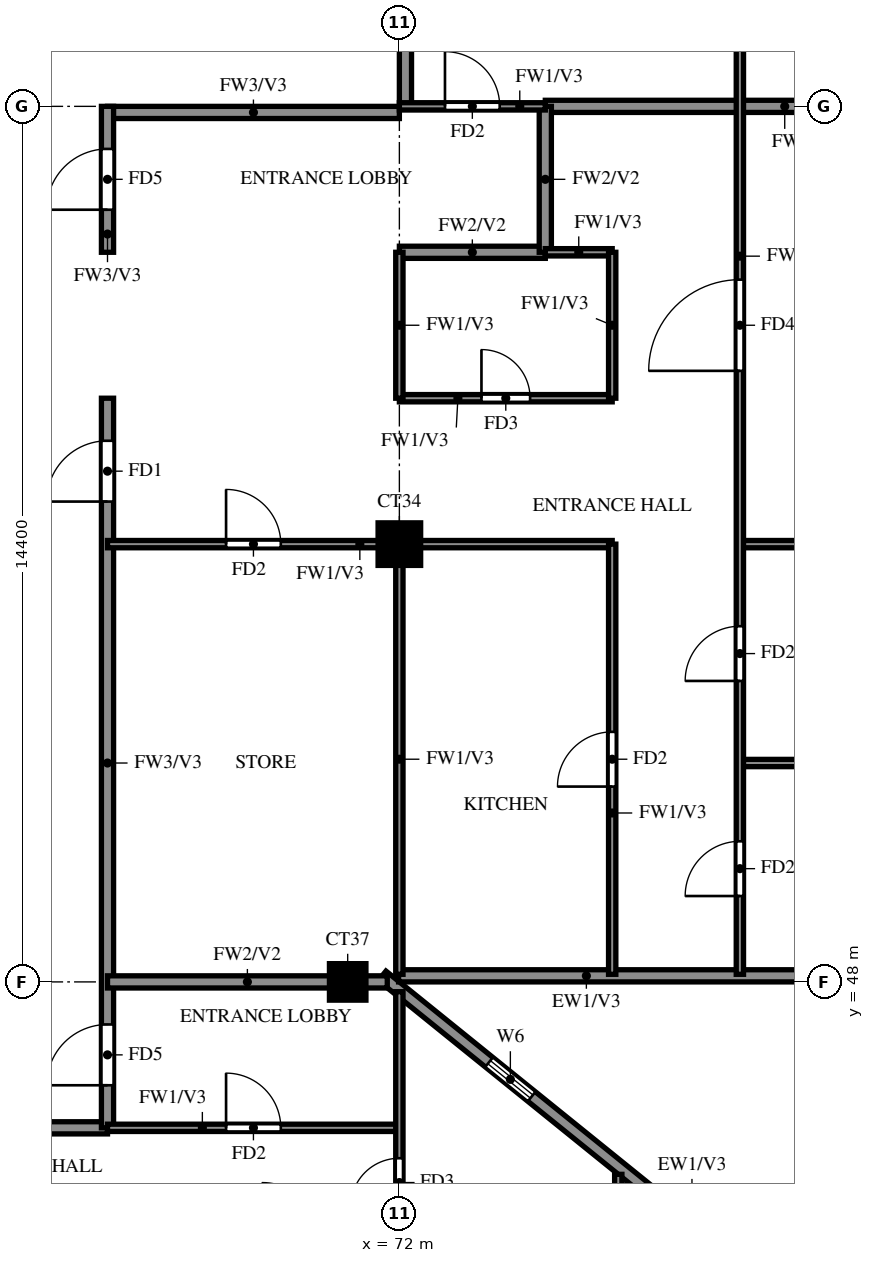
"""IFC4 building model, lengths in metres.
Left out: names, types, materials, properties, quantities, classifications, styles, units other than length and angle.
Written with IfcOpenShell. Run it as: python <this file> out.ifc"""

import sys

from ifc_helpers import new_model, si_unit, direction, frame, frame_2d, origin, origin_2d, place, context, subcontext, project, spatial, rectangle, extrude, source, transform, mapped, element, fill, save


model = new_model("IFC4")
c1 = context("Model", 3, precision=1e-05, world=origin(), true_north=direction((0.0, 1.0)))
c2 = subcontext(c1, "Body", "Model", "MODEL_VIEW")
j1 = project(units=[si_unit("LENGTHUNIT", "METRE"), si_unit("PLANEANGLEUNIT", "RADIAN")], contexts=[c1])
p1 = place(None, origin())
s1 = spatial("IfcSite", under=j1, at=p1, CompositionType="ELEMENT")
p2 = place(p1, origin())
s2 = spatial("IfcBuilding", under=s1, at=p2, CompositionType="ELEMENT")
p3 = place(p2, frame((0.0, 0.0, 260.5)))
s3 = spatial("IfcBuildingStorey", under=s2, at=p3, CompositionType="ELEMENT", Elevation=260.5)
m1 = source(origin(), c2, "Body", "SweptSolid", [
    extrude(rectangle(XDim=0.6, YDim=0.6, at=origin_2d()), origin(), (0.0, 0.0, 1.0), 3.22),
])
p4 = place(p3, frame((71.15, 48.0, 0.0), z_axis=(0.0, 0.0, 1.0), x_axis=(1.0, 0.0, 0.0)))
e1 = element("IfcColumn", 1, at=p4, inside=s3, PredefinedType="COLUMN", context=c2, shape_type="MappedRepresentation", body=[
    mapped(m1, transform((0.0, 0.0, 0.0))),
])
m2 = source(origin(), c2, "Body", "SweptSolid", [
    extrude(rectangle(XDim=0.7, YDim=0.7, at=origin_2d()), origin(), (0.0, 0.0, 1.0), 3.22),
])
p5 = place(p3, frame((72.0, 55.2, 0.0), z_axis=(0.0, 0.0, 1.0), x_axis=(1.0, 0.0, 0.0)))
e2 = element("IfcColumn", 2, at=p5, inside=s3, PredefinedType="COLUMN", context=c2, shape_type="MappedRepresentation", body=[
    mapped(m2, transform((0.0, 0.0, 0.0))),
])
p6 = place(p3, frame((81.907, 39.87, 0.0), z_axis=(0.0, 0.0, 1.0), x_axis=(-0.777936274417, 0.62834318087, 0.0)))
e3 = element("IfcWall", 3, at=p6, inside=s3, PredefinedType="SOLIDWALL", context=c2, shape_type="SweptSolid", body=[
    extrude(rectangle(XDim=13.099, YDim=0.2, at=frame_2d((6.549, 0.0))), origin(), (0.0, 0.0, 1.0), 3.22),
])
p7 = place(p6, frame((9.938, 0.0, 1.5)))
e4 = element("IfcOpeningElement", 4, at=p7, cuts=e3, PredefinedType="OPENING", context=c2, shape_type="SweptSolid", body=[
    extrude(rectangle(XDim=0.9, YDim=0.9, at=frame_2d((0.45, 0.45))), frame((0.0, 0.11, 0.0), z_axis=(0.0, -1.0, 0.0), x_axis=(1.0, 0.0, 0.0)), (0.0, 0.0, 1.0), 0.22),
])
p8 = place(p3, frame((71.987, 48.1, 0.0), z_axis=(0.0, 0.0, 1.0), x_axis=(1.0, 0.0, 0.0)))
e5 = element("IfcWall", 5, at=p8, inside=s3, PredefinedType="SOLIDWALL", context=c2, shape_type="SweptSolid", body=[
    extrude(rectangle(XDim=6.863, YDim=0.2, at=frame_2d((3.432, 0.0))), origin(), (0.0, 0.0, 1.0), 3.22),
])
p9 = place(p3, frame((60.0, 45.6, 0.0), z_axis=(0.0, 0.0, 1.0), x_axis=(1.0, 0.0, 0.0)))
e6 = element("IfcWall", 6, at=p9, inside=s3, PredefinedType="SOLIDWALL", context=c2, shape_type="SweptSolid", body=[
    extrude(rectangle(XDim=7.2, YDim=0.2, at=frame_2d((3.6, 0.0))), origin(), (0.0, 0.0, 1.0), 3.22),
])
p10 = place(p3, frame((67.2, 62.3, 0.0), z_axis=(0.0, 0.0, 1.0), x_axis=(1.0, 0.0, 0.0)))
e7 = element("IfcWall", 7, at=p10, inside=s3, PredefinedType="SOLIDWALL", context=c2, shape_type="SweptSolid", body=[
    extrude(rectangle(XDim=4.8, YDim=0.2, at=frame_2d((2.4, 0.0))), origin(), (0.0, 0.0, 1.0), 3.22),
])
p11 = place(p3, frame((67.2, 45.6, 0.0), z_axis=(0.0, 0.0, 1.0), x_axis=(0.0, 1.0, 0.0)))
e8 = element("IfcWall", 8, at=p11, inside=s3, PredefinedType="SOLIDWALL", context=c2, shape_type="SweptSolid", body=[
    extrude(rectangle(XDim=12.0, YDim=0.2, at=frame_2d((6.0, 0.0))), origin(), (0.0, 0.0, 1.0), 3.22),
])
p12 = place(p11, frame((10.3, 0.0, 0.0)))
e9 = element("IfcOpeningElement", 9, at=p12, cuts=e8, PredefinedType="OPENING", context=c2, shape_type="SweptSolid", body=[
    extrude(rectangle(XDim=1.0, YDim=2.1, at=frame_2d((0.5, 1.05))), frame((0.0, 0.11, 0.0), z_axis=(0.0, -1.0, 0.0), x_axis=(1.0, 0.0, 0.0)), (0.0, 0.0, 1.0), 0.22),
])
p13 = place(p11, frame((0.7, 0.0, 0.0)))
e10 = element("IfcOpeningElement", 10, at=p13, cuts=e8, PredefinedType="OPENING", context=c2, shape_type="SweptSolid", body=[
    extrude(rectangle(XDim=1.0, YDim=2.1, at=frame_2d((0.5, 1.05))), frame((0.0, 0.11, 0.0), z_axis=(0.0, -1.0, 0.0), x_axis=(1.0, 0.0, 0.0)), (0.0, 0.0, 1.0), 0.22),
])
p14 = place(p3, frame((67.2, 60.0, 0.0), z_axis=(0.0, 0.0, 1.0), x_axis=(0.0, 1.0, 0.0)))
e11 = element("IfcWall", 11, at=p14, inside=s3, PredefinedType="SOLIDWALL", context=c2, shape_type="SweptSolid", body=[
    extrude(rectangle(XDim=2.4, YDim=0.2, at=frame_2d((1.2, 0.0))), origin(), (0.0, 0.0, 1.0), 3.22),
])
p15 = place(p14, frame((0.7, 0.0, 0.0)))
e12 = element("IfcOpeningElement", 12, at=p15, cuts=e11, PredefinedType="OPENING", context=c2, shape_type="SweptSolid", body=[
    extrude(rectangle(XDim=1.0, YDim=2.1, at=frame_2d((0.5, 1.05))), frame((0.0, 0.11, 0.0), z_axis=(0.0, -1.0, 0.0), x_axis=(1.0, 0.0, 0.0)), (0.0, 0.0, 1.0), 0.22),
])
p16 = place(p3, frame((72.1, 62.4, 0.0), z_axis=(0.0, 0.0, 1.0), x_axis=(0.0, 1.0, 0.0)))
e13 = element("IfcWall", 13, at=p16, inside=s3, PredefinedType="SOLIDWALL", context=c2, shape_type="SweptSolid", body=[
    extrude(rectangle(XDim=15.6, YDim=0.2, at=frame_2d((7.8, 0.0))), origin(), (0.0, 0.0, 1.0), 3.22),
])
p17 = place(p3, frame((67.2, 48.0, 0.0), z_axis=(0.0, 0.0, 1.0), x_axis=(1.0, 0.0, 0.0)))
e14 = element("IfcWall", 14, at=p17, inside=s3, PredefinedType="SOLIDWALL", context=c2, shape_type="SweptSolid", body=[
    extrude(rectangle(XDim=4.601, YDim=0.2, at=frame_2d((2.301, 0.0))), origin(), (0.0, 0.0, 1.0), 3.22),
])
p18 = place(p3, frame((72.0, 60.0, 0.0), z_axis=(0.0, 0.0, 1.0), x_axis=(1.0, 0.0, 0.0)))
e15 = element("IfcWall", 15, at=p18, inside=s3, PredefinedType="SOLIDWALL", context=c2, shape_type="SweptSolid", body=[
    extrude(rectangle(XDim=2.4, YDim=0.2, at=frame_2d((1.2, 0.0))), origin(), (0.0, 0.0, 1.0), 3.22),
])
p19 = place(p3, frame((74.4, 62.4, 0.0), z_axis=(0.0, 0.0, 1.0), x_axis=(1.0, 0.0, 0.0)))
e16 = element("IfcWall", 16, at=p19, inside=s3, PredefinedType="SOLIDWALL", context=c2, shape_type="SweptSolid", body=[
    extrude(rectangle(XDim=7.875, YDim=0.2, at=frame_2d((3.938, 0.0))), origin(), (0.0, 0.0, 1.0), 3.22),
])
p20 = place(p3, frame((74.4, 60.0, 0.0), z_axis=(0.0, 0.0, 1.0), x_axis=(0.0, 1.0, 0.0)))
e17 = element("IfcWall", 17, at=p20, inside=s3, PredefinedType="SOLIDWALL", context=c2, shape_type="SweptSolid", body=[
    extrude(rectangle(XDim=2.4, YDim=0.2, at=frame_2d((1.2, 0.0))), origin(), (0.0, 0.0, 1.0), 3.22),
])
p21 = place(p3, frame((67.2, 45.6, 0.0), z_axis=(0.0, 0.0, 1.0), x_axis=(1.0, 0.0, 0.0)))
e18 = element("IfcWall", 18, at=p21, inside=s3, PredefinedType="PARTITIONING", context=c2, shape_type="SweptSolid", body=[
    extrude(rectangle(XDim=4.8, YDim=0.12, at=frame_2d((2.4, 0.0))), origin(), (0.0, 0.0, 1.0), 3.22),
])
p22 = place(p21, frame((1.95, 0.0, 0.0)))
e19 = element("IfcOpeningElement", 19, at=p22, cuts=e18, PredefinedType="OPENING", context=c2, shape_type="SweptSolid", body=[
    extrude(rectangle(XDim=0.9, YDim=2.1, at=frame_2d((0.45, 1.05))), frame((0.0, 0.07, 0.0), z_axis=(0.0, -1.0, 0.0), x_axis=(1.0, 0.0, 0.0)), (0.0, 0.0, 1.0), 0.14),
])
p23 = place(p3, frame((77.6, 51.6, 0.0), z_axis=(0.0, 0.0, 1.0), x_axis=(1.0, 0.0, 0.0)))
e20 = element("IfcWall", 20, at=p23, inside=s3, PredefinedType="PARTITIONING", context=c2, shape_type="SweptSolid", body=[
    extrude(rectangle(XDim=4.675, YDim=0.12, at=frame_2d((2.337, 0.0))), origin(), (0.0, 0.0, 1.0), 2.32),
])
p24 = place(p3, frame((67.2, 55.2, 0.0), z_axis=(0.0, 0.0, 1.0), x_axis=(1.0, 0.0, 0.0)))
e21 = element("IfcWall", 21, at=p24, inside=s3, PredefinedType="PARTITIONING", context=c2, shape_type="SweptSolid", body=[
    extrude(rectangle(XDim=8.3, YDim=0.12, at=frame_2d((4.15, 0.0))), origin(), (0.0, 0.0, 1.0), 3.22),
])
p25 = place(p24, frame((1.95, 0.0, 0.0)))
e22 = element("IfcOpeningElement", 22, at=p25, cuts=e21, PredefinedType="OPENING", context=c2, shape_type="SweptSolid", body=[
    extrude(rectangle(XDim=0.9, YDim=2.1, at=frame_2d((0.45, 1.05))), frame((0.0, 0.07, 0.0), z_axis=(0.0, -1.0, 0.0), x_axis=(1.0, 0.0, 0.0)), (0.0, 0.0, 1.0), 0.14),
])
p26 = place(p3, frame((77.6, 55.2, 0.0), z_axis=(0.0, 0.0, 1.0), x_axis=(1.0, 0.0, 0.0)))
e23 = element("IfcWall", 23, at=p26, inside=s3, PredefinedType="PARTITIONING", context=c2, shape_type="SweptSolid", body=[
    extrude(rectangle(XDim=4.675, YDim=0.12, at=frame_2d((2.337, 0.0))), origin(), (0.0, 0.0, 1.0), 3.22),
])
p27 = place(p3, frame((72.0, 57.6, 0.0), z_axis=(0.0, 0.0, 1.0), x_axis=(1.0, 0.0, 0.0)))
e24 = element("IfcWall", 24, at=p27, inside=s3, PredefinedType="PARTITIONING", context=c2, shape_type="SweptSolid", body=[
    extrude(rectangle(XDim=3.5, YDim=0.12, at=frame_2d((1.75, 0.0))), origin(), (0.0, 0.0, 1.0), 3.22),
])
p28 = place(p27, frame((1.35, 0.0, 0.0)))
e25 = element("IfcOpeningElement", 25, at=p28, cuts=e24, PredefinedType="OPENING", context=c2, shape_type="SweptSolid", body=[
    extrude(rectangle(XDim=0.8, YDim=2.1, at=frame_2d((0.4, 1.05))), frame((0.0, 0.07, 0.0), z_axis=(0.0, -1.0, 0.0), x_axis=(1.0, 0.0, 0.0)), (0.0, 0.0, 1.0), 0.14),
])
p29 = place(p3, frame((74.4, 60.0, 0.0), z_axis=(0.0, 0.0, 1.0), x_axis=(1.0, 0.0, 0.0)))
e26 = element("IfcWall", 26, at=p29, inside=s3, PredefinedType="PARTITIONING", context=c2, shape_type="SweptSolid", body=[
    extrude(rectangle(XDim=1.1, YDim=0.12, at=frame_2d((0.55, 0.0))), origin(), (0.0, 0.0, 1.0), 3.22),
])
p30 = place(p3, frame((72.0, 62.4, 0.0), z_axis=(0.0, 0.0, 1.0), x_axis=(1.0, 0.0, 0.0)))
e27 = element("IfcWall", 27, at=p30, inside=s3, PredefinedType="PARTITIONING", context=c2, shape_type="SweptSolid", body=[
    extrude(rectangle(XDim=2.4, YDim=0.12, at=frame_2d((1.2, 0.0))), origin(), (0.0, 0.0, 1.0), 3.22),
])
p31 = place(p30, frame((0.75, 0.0, 0.0)))
e28 = element("IfcOpeningElement", 28, at=p31, cuts=e27, PredefinedType="OPENING", context=c2, shape_type="SweptSolid", body=[
    extrude(rectangle(XDim=0.9, YDim=2.1, at=frame_2d((0.45, 1.05))), frame((0.0, 0.07, 0.0), z_axis=(0.0, -1.0, 0.0), x_axis=(1.0, 0.0, 0.0)), (0.0, 0.0, 1.0), 0.14),
])
p32 = place(p3, frame((72.0, 39.725, 0.0), z_axis=(0.0, 0.0, 1.0), x_axis=(0.0, 1.0, 0.0)))
e29 = element("IfcWall", 29, at=p32, inside=s3, PredefinedType="PARTITIONING", context=c2, shape_type="SweptSolid", body=[
    extrude(rectangle(XDim=8.114, YDim=0.12, at=frame_2d((4.057, 0.0))), origin(), (0.0, 0.0, 1.0), 2.32),
])
p33 = place(p32, frame((1.788, 0.0, 0.0)))
e30 = element("IfcOpeningElement", 30, at=p33, cuts=e29, PredefinedType="OPENING", context=c2, shape_type="SweptSolid", body=[
    extrude(rectangle(XDim=0.9, YDim=2.1, at=frame_2d((0.45, 1.05))), frame((0.0, 0.07, 0.0), z_axis=(0.0, -1.0, 0.0), x_axis=(1.0, 0.0, 0.0)), (0.0, 0.0, 1.0), 0.14),
])
p34 = place(p32, frame((4.575, 0.0, 0.0)))
e31 = element("IfcOpeningElement", 31, at=p34, cuts=e29, PredefinedType="OPENING", context=c2, shape_type="SweptSolid", body=[
    extrude(rectangle(XDim=0.8, YDim=2.1, at=frame_2d((0.4, 1.05))), frame((0.0, 0.07, 0.0), z_axis=(0.0, -1.0, 0.0), x_axis=(1.0, 0.0, 0.0)), (0.0, 0.0, 1.0), 0.14),
])
p35 = place(p3, frame((72.0, 48.125, 0.0), z_axis=(0.0, 0.0, 1.0), x_axis=(0.0, 1.0, 0.0)))
e32 = element("IfcWall", 32, at=p35, inside=s3, PredefinedType="PARTITIONING", context=c2, shape_type="SweptSolid", body=[
    extrude(rectangle(XDim=7.075, YDim=0.12, at=frame_2d((3.538, 0.0))), origin(), (0.0, 0.0, 1.0), 3.22),
])
p36 = place(p3, frame((72.0, 57.6, 0.0), z_axis=(0.0, 0.0, 1.0), x_axis=(0.0, 1.0, 0.0)))
e33 = element("IfcWall", 33, at=p36, inside=s3, PredefinedType="PARTITIONING", context=c2, shape_type="SweptSolid", body=[
    extrude(rectangle(XDim=2.4, YDim=0.12, at=frame_2d((1.2, 0.0))), origin(), (0.0, 0.0, 1.0), 3.22),
])
p37 = place(p3, frame((75.5, 48.125, 0.0), z_axis=(0.0, 0.0, 1.0), x_axis=(0.0, 1.0, 0.0)))
e34 = element("IfcWall", 34, at=p37, inside=s3, PredefinedType="PARTITIONING", context=c2, shape_type="SweptSolid", body=[
    extrude(rectangle(XDim=7.075, YDim=0.12, at=frame_2d((3.538, 0.0))), origin(), (0.0, 0.0, 1.0), 3.22),
])
p38 = place(p37, frame((3.087, 0.0, 0.0)))
e35 = element("IfcOpeningElement", 35, at=p38, cuts=e34, PredefinedType="OPENING", context=c2, shape_type="SweptSolid", body=[
    extrude(rectangle(XDim=0.9, YDim=2.1, at=frame_2d((0.45, 1.05))), frame((0.0, 0.07, 0.0), z_axis=(0.0, -1.0, 0.0), x_axis=(1.0, 0.0, 0.0)), (0.0, 0.0, 1.0), 0.14),
])
p39 = place(p3, frame((75.5, 57.6, 0.0), z_axis=(0.0, 0.0, 1.0), x_axis=(0.0, 1.0, 0.0)))
e36 = element("IfcWall", 36, at=p39, inside=s3, PredefinedType="PARTITIONING", context=c2, shape_type="SweptSolid", body=[
    extrude(rectangle(XDim=2.4, YDim=0.12, at=frame_2d((1.2, 0.0))), origin(), (0.0, 0.0, 1.0), 3.22),
])
p40 = place(p3, frame((75.6, 43.8, 0.0), z_axis=(0.0, 0.0, 1.0), x_axis=(0.0, 1.0, 0.0)))
e37 = element("IfcWall", 37, at=p40, inside=s3, PredefinedType="PARTITIONING", context=c2, shape_type="SweptSolid", body=[
    extrude(rectangle(XDim=1.035, YDim=0.12, at=frame_2d((0.518, 0.0))), origin(), (0.0, 0.0, 1.0), 2.32),
])
p41 = place(p3, frame((77.6, 48.125, 0.0), z_axis=(0.0, 0.0, 1.0), x_axis=(0.0, 1.0, 0.0)))
e38 = element("IfcWall", 38, at=p41, inside=s3, PredefinedType="PARTITIONING", context=c2, shape_type="SweptSolid", body=[
    extrude(rectangle(XDim=21.475, YDim=0.12, at=frame_2d((10.738, 0.0))), origin(), (0.0, 0.0, 1.0), 3.22),
])
p42 = place(p41, frame((1.288, 0.0, 0.0)))
e39 = element("IfcOpeningElement", 39, at=p42, cuts=e38, PredefinedType="OPENING", context=c2, shape_type="SweptSolid", body=[
    extrude(rectangle(XDim=0.9, YDim=2.1, at=frame_2d((0.45, 1.05))), frame((0.0, 0.07, 0.0), z_axis=(0.0, -1.0, 0.0), x_axis=(1.0, 0.0, 0.0)), (0.0, 0.0, 1.0), 0.14),
])
p43 = place(p41, frame((4.825, 0.0, 0.0)))
e40 = element("IfcOpeningElement", 40, at=p43, cuts=e38, PredefinedType="OPENING", context=c2, shape_type="SweptSolid", body=[
    extrude(rectangle(XDim=0.9, YDim=2.1, at=frame_2d((0.45, 1.05))), frame((0.0, 0.07, 0.0), z_axis=(0.0, -1.0, 0.0), x_axis=(1.0, 0.0, 0.0)), (0.0, 0.0, 1.0), 0.14),
])
p44 = place(p41, frame((9.925, 0.0, 0.0)))
e41 = element("IfcOpeningElement", 41, at=p44, cuts=e38, PredefinedType="OPENING", context=c2, shape_type="SweptSolid", body=[
    extrude(rectangle(XDim=1.5, YDim=2.1, at=frame_2d((0.75, 1.05))), frame((0.0, 0.07, 0.0), z_axis=(0.0, -1.0, 0.0), x_axis=(1.0, 0.0, 0.0)), (0.0, 0.0, 1.0), 0.14),
])
p45 = place(p41, frame((15.625, 0.0, 0.0)))
e42 = element("IfcOpeningElement", 42, at=p45, cuts=e38, PredefinedType="OPENING", context=c2, shape_type="SweptSolid", body=[
    extrude(rectangle(XDim=0.9, YDim=2.1, at=frame_2d((0.45, 1.05))), frame((0.0, 0.07, 0.0), z_axis=(0.0, -1.0, 0.0), x_axis=(1.0, 0.0, 0.0)), (0.0, 0.0, 1.0), 0.14),
])
p46 = place(p41, frame((19.225, 0.0, 0.0)))
e43 = element("IfcOpeningElement", 43, at=p46, cuts=e38, PredefinedType="OPENING", context=c2, shape_type="SweptSolid", body=[
    extrude(rectangle(XDim=0.9, YDim=2.1, at=frame_2d((0.45, 1.05))), frame((0.0, 0.07, 0.0), z_axis=(0.0, -1.0, 0.0), x_axis=(1.0, 0.0, 0.0)), (0.0, 0.0, 1.0), 0.14),
])
p47 = place(p7, origin())
e44 = element("IfcWindow", 44, at=p47, inside=s3, PartitioningType="SINGLE_PANEL", PredefinedType="WINDOW", context=c2, shape_type="SweptSolid", body=[
    extrude(rectangle(XDim=0.9, YDim=0.9, at=frame_2d((0.45, 0.45))), frame((0.0, 0.03, 0.0), z_axis=(0.0, -1.0, 0.0), x_axis=(1.0, 0.0, 0.0)), (0.0, 0.0, 1.0), 0.06),
])
fill(e4, e44)
p48 = place(p12, origin())
e45 = element("IfcDoor", 45, at=p48, inside=s3, OperationType="SINGLE_SWING_LEFT", PredefinedType="DOOR", context=c2, shape_type="SweptSolid", body=[
    extrude(rectangle(XDim=1.0, YDim=2.1, at=frame_2d((0.5, 1.05))), frame((0.0, 0.025, 0.0), z_axis=(0.0, -1.0, 0.0), x_axis=(1.0, 0.0, 0.0)), (0.0, 0.0, 1.0), 0.05),
])
fill(e9, e45)
p49 = place(p42, origin())
e46 = element("IfcDoor", 46, at=p49, inside=s3, OperationType="SINGLE_SWING_LEFT", PredefinedType="DOOR", context=c2, shape_type="SweptSolid", body=[
    extrude(rectangle(XDim=0.9, YDim=2.1, at=frame_2d((0.45, 1.05))), frame((0.0, 0.025, 0.0), z_axis=(0.0, -1.0, 0.0), x_axis=(1.0, 0.0, 0.0)), (0.0, 0.0, 1.0), 0.05),
])
fill(e39, e46)
p50 = place(p43, origin())
e47 = element("IfcDoor", 47, at=p50, inside=s3, OperationType="SINGLE_SWING_RIGHT", PredefinedType="DOOR", context=c2, shape_type="SweptSolid", body=[
    extrude(rectangle(XDim=0.9, YDim=2.1, at=frame_2d((0.45, 1.05))), frame((0.0, 0.025, 0.0), z_axis=(0.0, -1.0, 0.0), x_axis=(1.0, 0.0, 0.0)), (0.0, 0.0, 1.0), 0.05),
])
fill(e40, e47)
p51 = place(p44, origin())
e48 = element("IfcDoor", 48, at=p51, inside=s3, OperationType="SINGLE_SWING_LEFT", PredefinedType="DOOR", context=c2, shape_type="SweptSolid", body=[
    extrude(rectangle(XDim=1.5, YDim=2.1, at=frame_2d((0.75, 1.05))), frame((0.0, 0.025, 0.0), z_axis=(0.0, -1.0, 0.0), x_axis=(1.0, 0.0, 0.0)), (0.0, 0.0, 1.0), 0.05),
])
fill(e41, e48)
p52 = place(p38, origin())
e49 = element("IfcDoor", 49, at=p52, inside=s3, OperationType="SINGLE_SWING_LEFT", PredefinedType="DOOR", context=c2, shape_type="SweptSolid", body=[
    extrude(rectangle(XDim=0.9, YDim=2.1, at=frame_2d((0.45, 1.05))), frame((0.0, 0.025, 0.0), z_axis=(0.0, -1.0, 0.0), x_axis=(1.0, 0.0, 0.0)), (0.0, 0.0, 1.0), 0.05),
])
fill(e35, e49)
p53 = place(p28, origin())
e50 = element("IfcDoor", 50, at=p53, inside=s3, OperationType="SINGLE_SWING_RIGHT", PredefinedType="DOOR", context=c2, shape_type="SweptSolid", body=[
    extrude(rectangle(XDim=0.8, YDim=2.1, at=frame_2d((0.4, 1.05))), frame((0.0, 0.025, 0.0), z_axis=(0.0, -1.0, 0.0), x_axis=(1.0, 0.0, 0.0)), (0.0, 0.0, 1.0), 0.05),
])
fill(e25, e50)
p54 = place(p25, origin())
e51 = element("IfcDoor", 51, at=p54, inside=s3, OperationType="SINGLE_SWING_LEFT", PredefinedType="DOOR", context=c2, shape_type="SweptSolid", body=[
    extrude(rectangle(XDim=0.9, YDim=2.1, at=frame_2d((0.45, 1.05))), frame((0.0, 0.025, 0.0), z_axis=(0.0, -1.0, 0.0), x_axis=(1.0, 0.0, 0.0)), (0.0, 0.0, 1.0), 0.05),
])
fill(e22, e51)
p55 = place(p31, origin())
e52 = element("IfcDoor", 52, at=p55, inside=s3, OperationType="SINGLE_SWING_LEFT", PredefinedType="DOOR", context=c2, shape_type="SweptSolid", body=[
    extrude(rectangle(XDim=0.9, YDim=2.1, at=frame_2d((0.45, 1.05))), frame((0.0, 0.025, 0.0), z_axis=(0.0, -1.0, 0.0), x_axis=(1.0, 0.0, 0.0)), (0.0, 0.0, 1.0), 0.05),
])
fill(e28, e52)
p56 = place(p15, origin())
e53 = element("IfcDoor", 53, at=p56, inside=s3, OperationType="SINGLE_SWING_RIGHT", PredefinedType="DOOR", context=c2, shape_type="SweptSolid", body=[
    extrude(rectangle(XDim=1.0, YDim=2.1, at=frame_2d((0.5, 1.05))), frame((0.0, 0.025, 0.0), z_axis=(0.0, -1.0, 0.0), x_axis=(1.0, 0.0, 0.0)), (0.0, 0.0, 1.0), 0.05),
])
fill(e12, e53)
p57 = place(p22, origin())
e54 = element("IfcDoor", 54, at=p57, inside=s3, OperationType="SINGLE_SWING_LEFT", PredefinedType="DOOR", context=c2, shape_type="SweptSolid", body=[
    extrude(rectangle(XDim=0.9, YDim=2.1, at=frame_2d((0.45, 1.05))), frame((0.0, 0.025, 0.0), z_axis=(0.0, -1.0, 0.0), x_axis=(1.0, 0.0, 0.0)), (0.0, 0.0, 1.0), 0.05),
])
fill(e19, e54)
p58 = place(p13, origin())
e55 = element("IfcDoor", 55, at=p58, inside=s3, OperationType="SINGLE_SWING_RIGHT", PredefinedType="DOOR", context=c2, shape_type="SweptSolid", body=[
    extrude(rectangle(XDim=1.0, YDim=2.1, at=frame_2d((0.5, 1.05))), frame((0.0, 0.025, 0.0), z_axis=(0.0, -1.0, 0.0), x_axis=(1.0, 0.0, 0.0)), (0.0, 0.0, 1.0), 0.05),
])
fill(e10, e55)
p59 = place(p34, origin())
e56 = element("IfcDoor", 56, at=p59, inside=s3, OperationType="SINGLE_SWING_LEFT", PredefinedType="DOOR", context=c2, shape_type="SweptSolid", body=[
    extrude(rectangle(XDim=0.8, YDim=2.1, at=frame_2d((0.4, 1.05))), frame((0.0, 0.025, 0.0), z_axis=(0.0, -1.0, 0.0), x_axis=(1.0, 0.0, 0.0)), (0.0, 0.0, 1.0), 0.05),
])
fill(e31, e56)
save(model, sys.argv[1])
